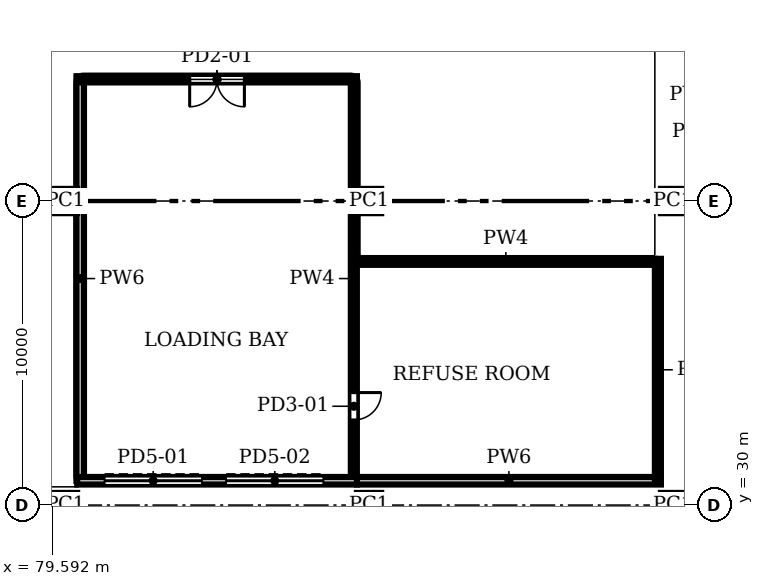
"""IFC4 building model, lengths in metres.
Left out: names, types, materials, properties, quantities, classifications, styles, units other than length and angle.
Written with IfcOpenShell. Run it as: python <this file> out.ifc"""

import sys

from ifc_helpers import new_model, si_unit, direction, frame, frame_2d, origin, origin_2d, place, context, subcontext, project, spatial, rectangle, extrude, element, fill, save


model = new_model("IFC4")
c1 = context("Model", 3, precision=1e-05, world=origin(), true_north=direction((0.0, 1.0)))
c2 = subcontext(c1, "Body", "Model", "MODEL_VIEW")
j1 = project(units=[si_unit("LENGTHUNIT", "METRE"), si_unit("PLANEANGLEUNIT", "RADIAN")], contexts=[c1])
p1 = place(None, origin())
s1 = spatial("IfcSite", under=j1, at=p1, CompositionType="ELEMENT")
p2 = place(p1, origin())
s2 = spatial("IfcBuilding", under=s1, at=p2, CompositionType="ELEMENT")
p3 = place(p2, origin())
s3 = spatial("IfcBuildingStorey", under=s2, at=p3, CompositionType="ELEMENT", Elevation=0.0)
for number, where, z_axis, x_axis in (
    (1, (80.0, 30.0, -0.1), (0.0, 0.0, 1.0), (1.0, 0.0, 0.0)),
    (2, (80.0, 40.0, -0.1), (0.0, 0.0, 1.0), (1.0, 0.0, 0.0)),
    (3, (90.0, 30.0, -0.1), (0.0, 0.0, 1.0), (1.0, 0.0, 0.0)),
    (4, (90.0, 40.0, -0.1), (0.0, 0.0, 1.0), (1.0, 0.0, 0.0)),
    (5, (100.0, 30.0, -0.1), (0.0, 0.0, 1.0), (1.0, 0.0, 0.0)),
    (6, (100.0, 40.0, -0.1), (0.0, 0.0, 1.0), (1.0, 0.0, 0.0)),
):
    element("IfcColumn", number, at=place(p3, frame(where, z_axis=z_axis, x_axis=x_axis)), inside=s3, PredefinedType="COLUMN", context=c2, shape_type="SweptSolid", body=[
        extrude(rectangle(XDim=0.8, YDim=0.8, at=origin_2d()), origin(), (0.0, 0.0, 1.0), 5.65),
    ])
p4 = place(p3, frame((80.4, 30.8, 0.0), z_axis=(0.0, 0.0, 1.0), x_axis=(1.0, 0.0, 0.0)))
e7 = element("IfcWall", 7, at=p4, inside=s3, PredefinedType="STANDARD", context=c2, shape_type="SweptSolid", body=[
    extrude(rectangle(XDim=9.2, YDim=0.25, at=frame_2d((4.6, 0.0))), origin(), (0.0, 0.0, 1.0), 5.55),
])
p5 = place(p4, frame((0.9, 0.0, 0.0)))
e8 = element("IfcOpeningElement", 8, at=p5, cuts=e7, PredefinedType="OPENING", context=c2, shape_type="SweptSolid", body=[
    extrude(rectangle(XDim=3.2, YDim=4.5, at=frame_2d((1.6, 2.25))), frame((0.0, 0.135, 0.0), z_axis=(0.0, -1.0, 0.0), x_axis=(1.0, 0.0, 0.0)), (0.0, 0.0, 1.0), 0.27),
])
p6 = place(p4, frame((4.9, 0.0, 0.0)))
e9 = element("IfcOpeningElement", 9, at=p6, cuts=e7, PredefinedType="OPENING", context=c2, shape_type="SweptSolid", body=[
    extrude(rectangle(XDim=3.2, YDim=4.5, at=frame_2d((1.6, 2.25))), frame((0.0, 0.135, 0.0), z_axis=(0.0, -1.0, 0.0), x_axis=(1.0, 0.0, 0.0)), (0.0, 0.0, 1.0), 0.27),
])
p7 = place(p3, frame((80.5, 30.8, 0.0), z_axis=(0.0, 0.0, 1.0), x_axis=(0.0, 1.0, 0.0)))
e10 = element("IfcWall", 10, at=p7, inside=s3, PredefinedType="STANDARD", context=c2, shape_type="SweptSolid", body=[
    extrude(rectangle(XDim=13.3, YDim=0.25, at=frame_2d((6.65, 0.0))), origin(), (0.0, 0.0, 1.0), 5.55),
])
p8 = place(p3, frame((89.5, 30.8, 0.0), z_axis=(0.0, 0.0, 1.0), x_axis=(0.0, 1.0, 0.0)))
e11 = element("IfcWall", 11, at=p8, inside=s3, PredefinedType="PARTITIONING", context=c2, shape_type="SweptSolid", body=[
    extrude(rectangle(XDim=13.3, YDim=0.2, at=frame_2d((6.65, 0.0))), origin(), (0.0, 0.0, 1.0), 5.55),
])
p9 = place(p8, frame((2.0, 0.0, 0.0)))
e12 = element("IfcOpeningElement", 12, at=p9, cuts=e11, PredefinedType="OPENING", context=c2, shape_type="SweptSolid", body=[
    extrude(rectangle(XDim=0.9, YDim=2.1, at=frame_2d((0.45, 1.05))), frame((0.0, 0.11, 0.0), z_axis=(0.0, -1.0, 0.0), x_axis=(1.0, 0.0, 0.0)), (0.0, 0.0, 1.0), 0.22),
])
p10 = place(p3, frame((80.4, 44.0, 0.0), z_axis=(0.0, 0.0, 1.0), x_axis=(1.0, 0.0, 0.0)))
e13 = element("IfcWall", 13, at=p10, inside=s3, PredefinedType="PARTITIONING", context=c2, shape_type="SweptSolid", body=[
    extrude(rectangle(XDim=9.2, YDim=0.2, at=frame_2d((4.6, 0.0))), origin(), (0.0, 0.0, 1.0), 5.55),
])
p11 = place(p10, frame((3.7, 0.0, 0.0)))
e14 = element("IfcOpeningElement", 14, at=p11, cuts=e13, PredefinedType="OPENING", context=c2, shape_type="SweptSolid", body=[
    extrude(rectangle(XDim=1.8, YDim=2.1, at=frame_2d((0.9, 1.05))), frame((0.0, 0.11, 0.0), z_axis=(0.0, -1.0, 0.0), x_axis=(1.0, 0.0, 0.0)), (0.0, 0.0, 1.0), 0.22),
])
p12 = place(p3, frame((89.6, 30.8, 0.0), z_axis=(0.0, 0.0, 1.0), x_axis=(1.0, 0.0, 0.0)))
e15 = element("IfcWall", 15, at=p12, inside=s3, PredefinedType="STANDARD", context=c2, shape_type="SweptSolid", body=[
    extrude(rectangle(XDim=10.0, YDim=0.25, at=frame_2d((5.0, 0.0))), origin(), (0.0, 0.0, 1.0), 5.55),
])
p13 = place(p3, frame((99.5, 30.8, 0.0), z_axis=(0.0, 0.0, 1.0), x_axis=(0.0, 1.0, 0.0)))
e16 = element("IfcWall", 16, at=p13, inside=s3, PredefinedType="PARTITIONING", context=c2, shape_type="SweptSolid", body=[
    extrude(rectangle(XDim=7.3, YDim=0.2, at=frame_2d((3.65, 0.0))), origin(), (0.0, 0.0, 1.0), 5.55),
])
p14 = place(p3, frame((89.6, 38.0, 0.0), z_axis=(0.0, 0.0, 1.0), x_axis=(1.0, 0.0, 0.0)))
e17 = element("IfcWall", 17, at=p14, inside=s3, PredefinedType="PARTITIONING", context=c2, shape_type="SweptSolid", body=[
    extrude(rectangle(XDim=9.8, YDim=0.2, at=frame_2d((4.9, 0.0))), origin(), (0.0, 0.0, 1.0), 5.55),
])
p15 = place(p5, frame((3.2, 0.0, 0.0), z_axis=(0.0, 0.0, 1.0), x_axis=(-1.0, 0.0, 0.0)))
e18 = element("IfcDoor", 18, at=p15, inside=s3, OperationType="SLIDING_TO_LEFT", PredefinedType="DOOR", context=c2, shape_type="SweptSolid", body=[
    extrude(rectangle(XDim=3.2, YDim=4.5, at=frame_2d((1.6, 2.25))), frame((0.0, 0.025, 0.0), z_axis=(0.0, -1.0, 0.0), x_axis=(1.0, 0.0, 0.0)), (0.0, 0.0, 1.0), 0.05),
])
fill(e8, e18)
p16 = place(p6, frame((3.2, 0.0, 0.0), z_axis=(0.0, 0.0, 1.0), x_axis=(-1.0, 0.0, 0.0)))
e19 = element("IfcDoor", 19, at=p16, inside=s3, OperationType="SLIDING_TO_LEFT", PredefinedType="DOOR", context=c2, shape_type="SweptSolid", body=[
    extrude(rectangle(XDim=3.2, YDim=4.5, at=frame_2d((1.6, 2.25))), frame((0.0, 0.025, 0.0), z_axis=(0.0, -1.0, 0.0), x_axis=(1.0, 0.0, 0.0)), (0.0, 0.0, 1.0), 0.05),
])
fill(e9, e19)
p17 = place(p11, frame((1.8, 0.0, 0.0), z_axis=(0.0, 0.0, 1.0), x_axis=(-1.0, 0.0, 0.0)))
e20 = element("IfcDoor", 20, at=p17, inside=s3, OperationType="DOUBLE_DOOR_SINGLE_SWING", PredefinedType="DOOR", context=c2, shape_type="SweptSolid", body=[
    extrude(rectangle(XDim=1.8, YDim=2.1, at=frame_2d((0.9, 1.05))), frame((0.0, 0.025, 0.0), z_axis=(0.0, -1.0, 0.0), x_axis=(1.0, 0.0, 0.0)), (0.0, 0.0, 1.0), 0.05),
])
fill(e14, e20)
p18 = place(p9, frame((0.9, 0.0, 0.0), z_axis=(0.0, 0.0, 1.0), x_axis=(-1.0, 0.0, 0.0)))
e21 = element("IfcDoor", 21, at=p18, inside=s3, OperationType="SINGLE_SWING_LEFT", PredefinedType="DOOR", context=c2, shape_type="SweptSolid", body=[
    extrude(rectangle(XDim=0.9, YDim=2.1, at=frame_2d((0.45, 1.05))), frame((0.0, 0.025, 0.0), z_axis=(0.0, -1.0, 0.0), x_axis=(1.0, 0.0, 0.0)), (0.0, 0.0, 1.0), 0.05),
])
fill(e12, e21)
save(model, sys.argv[1])
